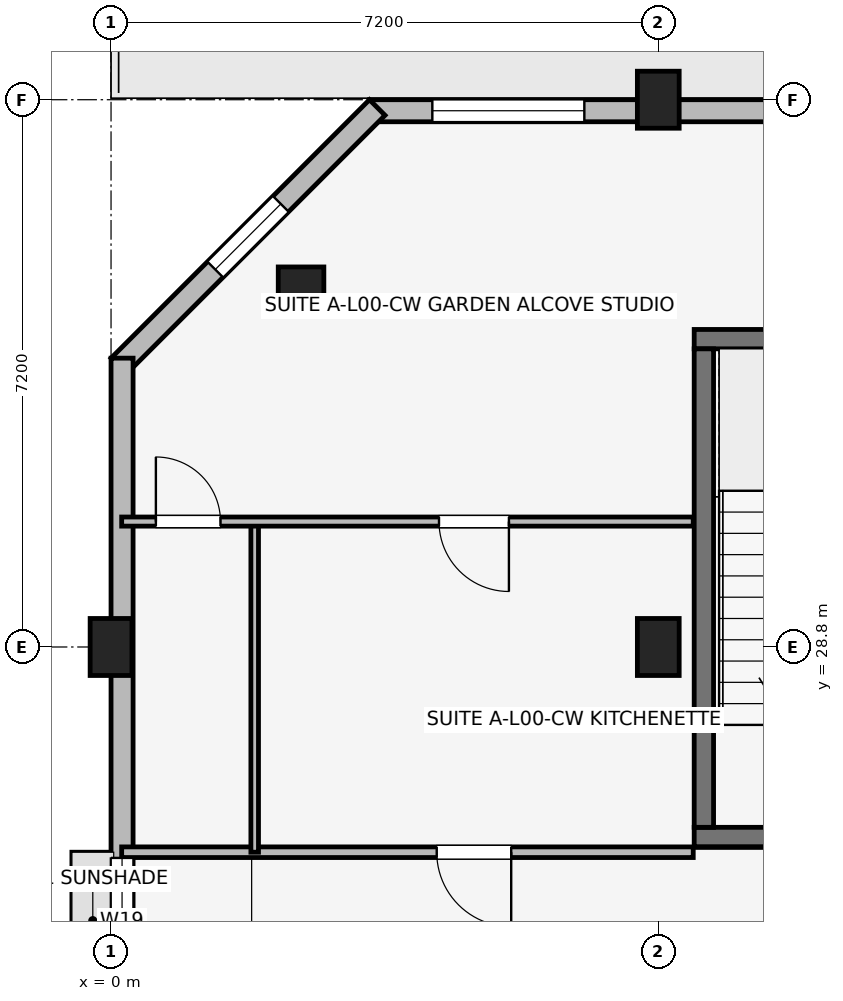
"""IFC4 building model, lengths in metres.
Left out: names, types, materials, properties, quantities, classifications, styles, units other than length and angle.
Written with IfcOpenShell. Run it as: python <this file> out.ifc"""

import sys

from ifc_helpers import new_model, si_unit, direction, frame, frame_2d, origin, origin_2d, place, context, subcontext, project, spatial, rectangle, extrude, element, fill, save


model = new_model("IFC4")
c1 = context("Model", 3, precision=1e-05, world=origin(), true_north=direction((0.0, 1.0)))
c2 = subcontext(c1, "Body", "Model", "MODEL_VIEW")
j1 = project(units=[si_unit("LENGTHUNIT", "METRE"), si_unit("PLANEANGLEUNIT", "RADIAN")], contexts=[c1])
p1 = place(None, origin())
s1 = spatial("IfcSite", under=j1, at=p1, CompositionType="ELEMENT")
p2 = place(p1, origin())
s2 = spatial("IfcBuilding", under=s1, at=p2, CompositionType="ELEMENT")
p3 = place(p2, origin())
s3 = spatial("IfcBuildingStorey", under=s2, at=p3, CompositionType="ELEMENT", Elevation=0.0)
p4 = place(p3, frame((0.0, 28.8, 0.0), z_axis=(0.0, 0.0, 1.0), x_axis=(1.0, 0.0, 0.0)))
e1 = element("IfcColumn", 1, at=p4, inside=s3, PredefinedType="COLUMN", context=c2, shape_type="SweptSolid", body=[
    extrude(rectangle(XDim=0.55, YDim=0.75, at=origin_2d()), origin(), (0.0, 0.0, 1.0), 4.5),
])
p5 = place(p3, frame((2.5, 33.5, 0.0), z_axis=(0.0, 0.0, 1.0), x_axis=(1.0, 0.0, 0.0)))
e2 = element("IfcColumn", 2, at=p5, inside=s3, PredefinedType="COLUMN", context=c2, shape_type="SweptSolid", body=[
    extrude(rectangle(XDim=0.6, YDim=0.6, at=origin_2d()), origin(), (0.0, 0.0, 1.0), 4.5),
])
for number, where, z_axis, x_axis in (
    (3, (7.2, 28.8, 0.0), (0.0, 0.0, 1.0), (1.0, 0.0, 0.0)),
    (4, (7.2, 36.0, 0.0), (0.0, 0.0, 1.0), (1.0, 0.0, 0.0)),
):
    element("IfcColumn", number, at=place(p3, frame(where, z_axis=z_axis, x_axis=x_axis)), inside=s3, PredefinedType="COLUMN", context=c2, shape_type="SweptSolid", body=[
        extrude(rectangle(XDim=0.55, YDim=0.75, at=origin_2d()), origin(), (0.0, 0.0, 1.0), 4.5),
    ])
p6 = place(p3, frame((7.673, 26.3, 0.0), z_axis=(0.0, 0.0, 1.0), x_axis=(1.0, 0.0, 0.0)))
e5 = element("IfcWall", 5, at=p6, inside=s3, PredefinedType="SHEAR", context=c2, shape_type="SweptSolid", body=[
    extrude(rectangle(XDim=3.305, YDim=0.255, at=frame_2d((1.652, 0.0))), origin(), (0.0, 0.0, 1.0), 4.5),
])
p7 = place(p6, frame((2.177, 0.0, 0.0), z_axis=(0.0, 0.0, 1.0), x_axis=(-1.0, 0.0, 0.0)))
e6 = element("IfcOpeningElement", 6, at=p7, cuts=e5, PredefinedType="OPENING", context=c2, shape_type="SweptSolid", body=[
    extrude(rectangle(XDim=1.05, YDim=2.12, at=frame_2d((0.525, 1.06))), frame((0.0, 0.137, 0.0), z_axis=(0.0, -1.0, 0.0), x_axis=(1.0, 0.0, 0.0)), (0.0, 0.0, 1.0), 0.275),
])
p8 = place(p3, frame((7.673, 32.85, 0.0), z_axis=(0.0, 0.0, 1.0), x_axis=(1.0, 0.0, 0.0)))
e7 = element("IfcWall", 7, at=p8, inside=s3, PredefinedType="SHEAR", context=c2, shape_type="SweptSolid", body=[
    extrude(rectangle(XDim=3.305, YDim=0.255, at=frame_2d((1.652, 0.0))), origin(), (0.0, 0.0, 1.0), 4.5),
])
p9 = place(p3, frame((7.8, 26.427, 0.0), z_axis=(0.0, 0.0, 1.0), x_axis=(0.0, 1.0, 0.0)))
e8 = element("IfcWall", 8, at=p9, inside=s3, PredefinedType="SHEAR", context=c2, shape_type="SweptSolid", body=[
    extrude(rectangle(XDim=6.295, YDim=0.255, at=frame_2d((3.147, 0.0))), origin(), (0.0, 0.0, 1.0), 4.5),
])
p10 = place(p3, frame((32.6, 35.855, 0.0), z_axis=(0.0, 0.0, 1.0), x_axis=(-1.0, 0.0, 0.0)))
e9 = element("IfcWall", 9, at=p10, inside=s3, PredefinedType="SOLIDWALL", context=c2, shape_type="SweptSolid", body=[
    extrude(rectangle(XDim=29.2, YDim=0.29, at=frame_2d((14.6, 0.0))), origin(), (0.0, 0.0, 1.0), 3.53),
])
p11 = place(p10, frame((20.4, 0.0, 0.0), z_axis=(0.0, 0.0, 1.0), x_axis=(-1.0, 0.0, 0.0)))
e10 = element("IfcOpeningElement", 10, at=p11, cuts=e9, PredefinedType="OPENING", context=c2, shape_type="SweptSolid", body=[
    extrude(rectangle(XDim=1.1, YDim=2.15, at=frame_2d((0.55, 1.075))), frame((0.0, 0.155, 0.0), z_axis=(0.0, -1.0, 0.0), x_axis=(1.0, 0.0, 0.0)), (0.0, 0.0, 1.0), 0.31),
])
p12 = place(p10, frame((9.8, 0.0, 0.0), z_axis=(0.0, 0.0, 1.0), x_axis=(-1.0, 0.0, 0.0)))
e11 = element("IfcOpeningElement", 11, at=p12, cuts=e9, PredefinedType="OPENING", context=c2, shape_type="SweptSolid", body=[
    extrude(rectangle(XDim=1.1, YDim=2.15, at=frame_2d((0.55, 1.075))), frame((0.0, 0.155, 0.0), z_axis=(0.0, -1.0, 0.0), x_axis=(1.0, 0.0, 0.0)), (0.0, 0.0, 1.0), 0.31),
])
p13 = place(p10, frame((0.897, 0.0, 0.7)))
e12 = element("IfcOpeningElement", 12, at=p13, cuts=e9, PredefinedType="OPENING", context=c2, shape_type="SweptSolid", body=[
    extrude(rectangle(XDim=1.86, YDim=1.6, at=frame_2d((0.93, 0.8))), frame((0.0, 0.155, 0.0), z_axis=(0.0, -1.0, 0.0), x_axis=(1.0, 0.0, 0.0)), (0.0, 0.0, 1.0), 0.31),
])
p14 = place(p10, frame((26.373, 0.0, 0.7)))
e13 = element("IfcOpeningElement", 13, at=p14, cuts=e9, PredefinedType="OPENING", context=c2, shape_type="SweptSolid", body=[
    extrude(rectangle(XDim=2.0, YDim=1.65, at=frame_2d((1.0, 0.825))), frame((0.0, 0.155, 0.0), z_axis=(0.0, -1.0, 0.0), x_axis=(1.0, 0.0, 0.0)), (0.0, 0.0, 1.0), 0.31),
])
p15 = place(p3, frame((3.502, 35.897, 0.0), z_axis=(0.0, 0.0, 1.0), x_axis=(-0.707106781187, -0.707106781187, 0.0)))
e14 = element("IfcWall", 14, at=p15, inside=s3, PredefinedType="SOLIDWALL", context=c2, shape_type="SweptSolid", body=[
    extrude(rectangle(XDim=4.808, YDim=0.29, at=frame_2d((2.404, 0.0))), origin(), (0.0, 0.0, 1.0), 4.175),
])
p16 = place(p15, frame((1.794, 0.0, 0.85)))
e15 = element("IfcOpeningElement", 15, at=p16, cuts=e14, PredefinedType="OPENING", context=c2, shape_type="SweptSolid", body=[
    extrude(rectangle(XDim=1.22, YDim=1.5, at=frame_2d((0.61, 0.75))), frame((0.0, 0.155, 0.0), z_axis=(0.0, -1.0, 0.0), x_axis=(1.0, 0.0, 0.0)), (0.0, 0.0, 1.0), 0.31),
])
p17 = place(p3, frame((0.145, 32.6, 0.0), z_axis=(0.0, 0.0, 1.0), x_axis=(0.0, -1.0, 0.0)))
e16 = element("IfcWall", 16, at=p17, inside=s3, PredefinedType="SOLIDWALL", context=c2, shape_type="SweptSolid", body=[
    extrude(rectangle(XDim=14.8, YDim=0.29, at=frame_2d((7.4, 0.0))), origin(), (0.0, 0.0, 1.0), 3.53),
])
p18 = place(p17, frame((6.575, 0.0, 1.05)))
e17 = element("IfcOpeningElement", 17, at=p18, cuts=e16, PredefinedType="OPENING", context=c2, shape_type="SweptSolid", body=[
    extrude(rectangle(XDim=1.65, YDim=1.15, at=frame_2d((0.825, 0.575))), frame((0.0, 0.155, 0.0), z_axis=(0.0, -1.0, 0.0), x_axis=(1.0, 0.0, 0.0)), (0.0, 0.0, 1.0), 0.31),
])
p19 = place(p17, frame((12.385, 0.0, 0.75)))
e18 = element("IfcOpeningElement", 18, at=p19, cuts=e16, PredefinedType="OPENING", context=c2, shape_type="SweptSolid", body=[
    extrude(rectangle(XDim=1.3, YDim=1.55, at=frame_2d((0.65, 0.775))), frame((0.0, 0.155, 0.0), z_axis=(0.0, -1.0, 0.0), x_axis=(1.0, 0.0, 0.0)), (0.0, 0.0, 1.0), 0.31),
])
p20 = place(p3, frame((0.14, 26.1, 0.0), z_axis=(0.0, 0.0, 1.0), x_axis=(1.0, 0.0, 0.0)))
e19 = element("IfcWall", 19, at=p20, inside=s3, PredefinedType="PARTITIONING", context=c2, shape_type="SweptSolid", body=[
    extrude(rectangle(XDim=7.52, YDim=0.14, at=frame_2d((3.76, 0.0))), origin(), (0.0, 0.0, 1.0), 3.15),
])
p21 = place(p20, frame((5.125, 0.0, 0.0), z_axis=(0.0, 0.0, 1.0), x_axis=(-1.0, 0.0, 0.0)))
e20 = element("IfcOpeningElement", 20, at=p21, cuts=e19, PredefinedType="OPENING", context=c2, shape_type="SweptSolid", body=[
    extrude(rectangle(XDim=0.98, YDim=2.1, at=frame_2d((0.49, 1.05))), frame((0.0, 0.08, 0.0), z_axis=(0.0, -1.0, 0.0), x_axis=(1.0, 0.0, 0.0)), (0.0, 0.0, 1.0), 0.16),
])
p22 = place(p3, frame((1.89, 26.1, 0.0), z_axis=(0.0, 0.0, 1.0), x_axis=(0.0, 1.0, 0.0)))
e21 = element("IfcWall", 21, at=p22, inside=s3, PredefinedType="PARTITIONING", context=c2, shape_type="SweptSolid", body=[
    extrude(rectangle(XDim=4.35, YDim=0.1, at=frame_2d((2.175, 0.0))), origin(), (0.0, 0.0, 1.0), 3.15),
])
p23 = place(p3, frame((0.14, 30.45, 0.0), z_axis=(0.0, 0.0, 1.0), x_axis=(1.0, 0.0, 0.0)))
e22 = element("IfcWall", 22, at=p23, inside=s3, PredefinedType="PARTITIONING", context=c2, shape_type="SweptSolid", body=[
    extrude(rectangle(XDim=7.52, YDim=0.12, at=frame_2d((3.76, 0.0))), origin(), (0.0, 0.0, 1.0), 3.15),
])
p24 = place(p23, frame((0.45, 0.0, 0.0)))
e23 = element("IfcOpeningElement", 23, at=p24, cuts=e22, PredefinedType="OPENING", context=c2, shape_type="SweptSolid", body=[
    extrude(rectangle(XDim=0.85, YDim=2.08, at=frame_2d((0.425, 1.04))), frame((0.0, 0.07, 0.0), z_axis=(0.0, -1.0, 0.0), x_axis=(1.0, 0.0, 0.0)), (0.0, 0.0, 1.0), 0.14),
])
p25 = place(p23, frame((5.095, 0.0, 0.0), z_axis=(0.0, 0.0, 1.0), x_axis=(-1.0, 0.0, 0.0)))
e24 = element("IfcOpeningElement", 24, at=p25, cuts=e22, PredefinedType="OPENING", context=c2, shape_type="SweptSolid", body=[
    extrude(rectangle(XDim=0.92, YDim=2.08, at=frame_2d((0.46, 1.04))), frame((0.0, 0.07, 0.0), z_axis=(0.0, -1.0, 0.0), x_axis=(1.0, 0.0, 0.0)), (0.0, 0.0, 1.0), 0.14),
])
p26 = place(p16, origin())
e25 = element("IfcWindow", 25, at=p26, inside=s3, PartitioningType="SINGLE_PANEL", PredefinedType="WINDOW", context=c2, shape_type="SweptSolid", body=[
    extrude(rectangle(XDim=1.22, YDim=1.5, at=frame_2d((0.61, 0.75))), frame((0.0, 0.03, 0.0), z_axis=(0.0, -1.0, 0.0), x_axis=(1.0, 0.0, 0.0)), (0.0, 0.0, 1.0), 0.06),
])
fill(e15, e25)
p27 = place(p14, origin())
e26 = element("IfcWindow", 26, at=p27, inside=s3, PartitioningType="SINGLE_PANEL", PredefinedType="WINDOW", context=c2, shape_type="SweptSolid", body=[
    extrude(rectangle(XDim=2.0, YDim=1.65, at=frame_2d((1.0, 0.825))), frame((0.0, 0.03, 0.0), z_axis=(0.0, -1.0, 0.0), x_axis=(1.0, 0.0, 0.0)), (0.0, 0.0, 1.0), 0.06),
])
fill(e13, e26)
p28 = place(p18, origin())
e27 = element("IfcWindow", 27, at=p28, inside=s3, PartitioningType="SINGLE_PANEL", PredefinedType="WINDOW", context=c2, shape_type="SweptSolid", body=[
    extrude(rectangle(XDim=1.65, YDim=1.15, at=frame_2d((0.825, 0.575))), frame((0.0, 0.03, 0.0), z_axis=(0.0, -1.0, 0.0), x_axis=(1.0, 0.0, 0.0)), (0.0, 0.0, 1.0), 0.06),
])
fill(e17, e27)
p29 = place(p21, origin())
e28 = element("IfcDoor", 28, at=p29, inside=s3, OperationType="SINGLE_SWING_RIGHT", PredefinedType="DOOR", context=c2, shape_type="SweptSolid", body=[
    extrude(rectangle(XDim=0.98, YDim=2.1, at=frame_2d((0.49, 1.05))), frame((0.0, 0.025, 0.0), z_axis=(0.0, -1.0, 0.0), x_axis=(1.0, 0.0, 0.0)), (0.0, 0.0, 1.0), 0.05),
])
fill(e20, e28)
p30 = place(p24, origin())
e29 = element("IfcDoor", 29, at=p30, inside=s3, OperationType="SINGLE_SWING_LEFT", PredefinedType="DOOR", context=c2, shape_type="SweptSolid", body=[
    extrude(rectangle(XDim=0.85, YDim=2.08, at=frame_2d((0.425, 1.04))), frame((0.0, 0.025, 0.0), z_axis=(0.0, -1.0, 0.0), x_axis=(1.0, 0.0, 0.0)), (0.0, 0.0, 1.0), 0.05),
])
fill(e23, e29)
p31 = place(p25, origin())
e30 = element("IfcDoor", 30, at=p31, inside=s3, OperationType="SINGLE_SWING_RIGHT", PredefinedType="DOOR", context=c2, shape_type="SweptSolid", body=[
    extrude(rectangle(XDim=0.92, YDim=2.08, at=frame_2d((0.46, 1.04))), frame((0.0, 0.025, 0.0), z_axis=(0.0, -1.0, 0.0), x_axis=(1.0, 0.0, 0.0)), (0.0, 0.0, 1.0), 0.05),
])
fill(e24, e30)
save(model, sys.argv[1])
